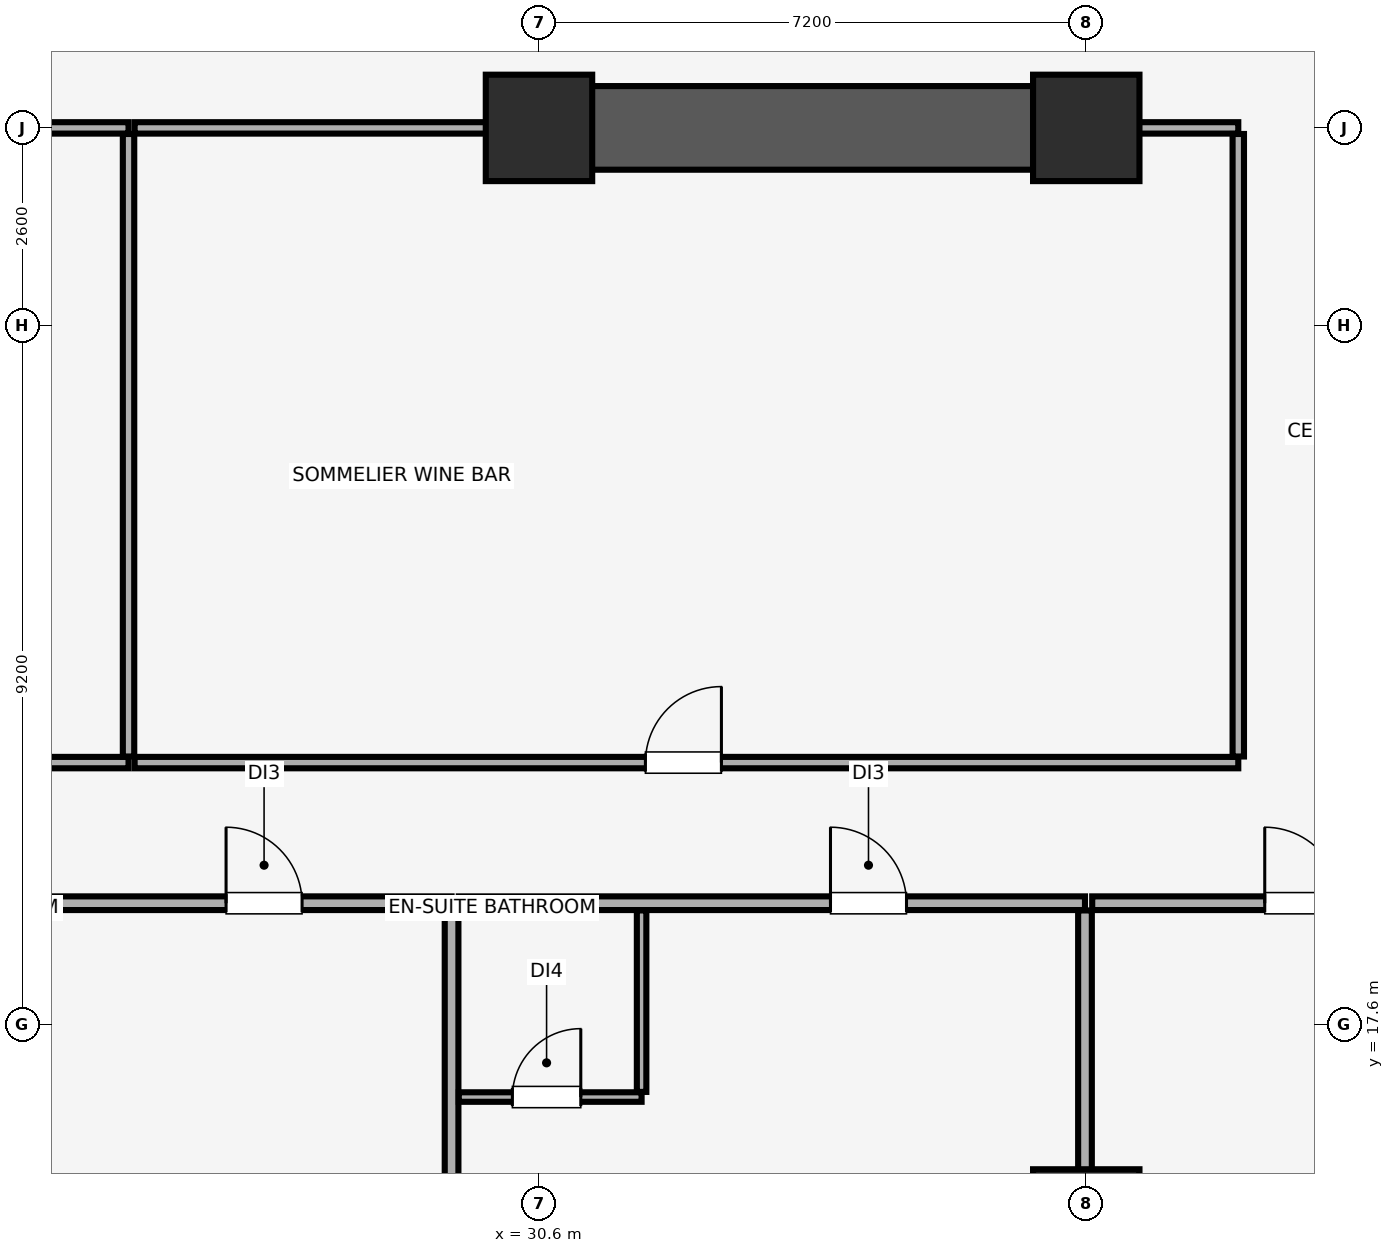
"""IFC4 building model, lengths in metres.
Left out: names, types, materials, properties, quantities, classifications, styles, units other than length and angle.
Written with IfcOpenShell. Run it as: python <this file> out.ifc"""

import sys

from ifc_helpers import new_model, si_unit, direction, frame, frame_2d, origin, origin_2d, place, context, subcontext, project, spatial, rectangle, extrude, element, fill, save


model = new_model("IFC4")
c1 = context("Model", 3, precision=1e-05, world=origin(), true_north=direction((0.0, 1.0)))
c2 = subcontext(c1, "Body", "Model", "MODEL_VIEW")
j1 = project(units=[si_unit("LENGTHUNIT", "METRE"), si_unit("PLANEANGLEUNIT", "RADIAN")], contexts=[c1])
p1 = place(None, origin())
s1 = spatial("IfcSite", under=j1, at=p1, CompositionType="ELEMENT")
p2 = place(p1, origin())
s2 = spatial("IfcBuilding", under=s1, at=p2, CompositionType="ELEMENT")
p3 = place(p2, frame((0.0, 0.0, 76.4)))
s3 = spatial("IfcBuildingStorey", under=s2, at=p3, CompositionType="ELEMENT", Elevation=76.4)
for number, where, z_axis, x_axis in (
    (1, (37.8, 15.0, 0.0), (0.0, 0.0, 1.0), (1.0, 0.0, 0.0)),
    (2, (30.6, 29.4, 0.0), (0.0, 0.0, 1.0), (1.0, 0.0, 0.0)),
    (3, (37.8, 29.4, 0.0), (0.0, 0.0, 1.0), (1.0, 0.0, 0.0)),
):
    element("IfcColumn", number, at=place(p3, frame(where, z_axis=z_axis, x_axis=x_axis)), inside=s3, PredefinedType="COLUMN", context=c2, shape_type="SweptSolid", body=[
        extrude(rectangle(XDim=1.4, YDim=1.4, at=origin_2d()), origin(), (0.0, 0.0, 1.0), 3.4),
    ])
p4 = place(p3, frame((30.4, 29.4, 0.0), z_axis=(0.0, 0.0, 1.0), x_axis=(1.0, 0.0, 0.0)))
e4 = element("IfcWall", 4, at=p4, inside=s3, PredefinedType="SHEAR", context=c2, shape_type="SweptSolid", body=[
    extrude(rectangle(XDim=7.6, YDim=1.1, at=frame_2d((3.8, 0.0))), origin(), (0.0, 0.0, 1.0), 3.4),
])
p5 = place(p3, frame((21.212, 19.2, 0.0), z_axis=(0.0, 0.0, 1.0), x_axis=(1.0, 0.0, 0.0)))
e5 = element("IfcWall", 5, at=p5, inside=s3, PredefinedType="PARTITIONING", context=c2, shape_type="SweptSolid", body=[
    extrude(rectangle(XDim=8.238, YDim=0.18, at=frame_2d((4.119, 0.0))), origin(), (0.0, 0.0, 1.0), 3.4),
])
p6 = place(p5, frame((5.271, 0.0, 0.0)))
e6 = element("IfcOpeningElement", 6, at=p6, cuts=e5, PredefinedType="OPENING", context=c2, shape_type="SweptSolid", body=[
    extrude(rectangle(XDim=1.0, YDim=2.15, at=frame_2d((0.5, 1.075))), frame((0.0, 0.1, 0.0), z_axis=(0.0, -1.0, 0.0), x_axis=(1.0, 0.0, 0.0)), (0.0, 0.0, 1.0), 0.2),
])
p7 = place(p3, frame((29.45, 0.15, 0.0), z_axis=(0.0, 0.0, 1.0), x_axis=(0.0, 1.0, 0.0)))
e7 = element("IfcWall", 7, at=p7, inside=s3, PredefinedType="PARTITIONING", context=c2, shape_type="SweptSolid", body=[
    extrude(rectangle(XDim=18.955, YDim=0.18, at=frame_2d((9.478, 0.0))), origin(), (0.0, 0.0, 1.0), 3.4),
])
p8 = place(p3, frame((29.545, 19.2, 0.0), z_axis=(0.0, 0.0, 1.0), x_axis=(1.0, 0.0, 0.0)))
e8 = element("IfcWall", 8, at=p8, inside=s3, PredefinedType="PARTITIONING", context=c2, shape_type="SweptSolid", body=[
    extrude(rectangle(XDim=8.238, YDim=0.18, at=frame_2d((4.119, 0.0))), origin(), (0.0, 0.0, 1.0), 3.4),
])
p9 = place(p8, frame((4.89, 0.0, 0.0)))
e9 = element("IfcOpeningElement", 9, at=p9, cuts=e8, PredefinedType="OPENING", context=c2, shape_type="SweptSolid", body=[
    extrude(rectangle(XDim=1.0, YDim=2.15, at=frame_2d((0.5, 1.075))), frame((0.0, 0.1, 0.0), z_axis=(0.0, -1.0, 0.0), x_axis=(1.0, 0.0, 0.0)), (0.0, 0.0, 1.0), 0.2),
])
p10 = place(p3, frame((37.783, 0.15, 0.0), z_axis=(0.0, 0.0, 1.0), x_axis=(0.0, 1.0, 0.0)))
e10 = element("IfcWall", 10, at=p10, inside=s3, PredefinedType="PARTITIONING", context=c2, shape_type="SweptSolid", body=[
    extrude(rectangle(XDim=18.955, YDim=0.18, at=frame_2d((9.478, 0.0))), origin(), (0.0, 0.0, 1.0), 2.8),
])
p11 = place(p3, frame((29.545, 16.65, 0.0), z_axis=(0.0, 0.0, 1.0), x_axis=(1.0, 0.0, 0.0)))
e11 = element("IfcWall", 11, at=p11, inside=s3, PredefinedType="PARTITIONING", context=c2, shape_type="SweptSolid", body=[
    extrude(rectangle(XDim=2.405, YDim=0.125, at=frame_2d((1.203, 0.0))), origin(), (0.0, 0.0, 1.0), 3.4),
])
p12 = place(p11, frame((0.705, 0.0, 0.0)))
e12 = element("IfcOpeningElement", 12, at=p12, cuts=e11, PredefinedType="OPENING", context=c2, shape_type="SweptSolid", body=[
    extrude(rectangle(XDim=0.9, YDim=2.1, at=frame_2d((0.45, 1.05))), frame((0.0, 0.073, 0.0), z_axis=(0.0, -1.0, 0.0), x_axis=(1.0, 0.0, 0.0)), (0.0, 0.0, 1.0), 0.145),
])
p13 = place(p3, frame((31.95, 16.718, 0.0), z_axis=(0.0, 0.0, 1.0), x_axis=(0.0, 1.0, 0.0)))
e13 = element("IfcWall", 13, at=p13, inside=s3, PredefinedType="PARTITIONING", context=c2, shape_type="SweptSolid", body=[
    extrude(rectangle(XDim=2.387, YDim=0.125, at=frame_2d((1.194, 0.0))), origin(), (0.0, 0.0, 1.0), 3.4),
])
p14 = place(p3, frame((37.878, 19.2, 0.0), z_axis=(0.0, 0.0, 1.0), x_axis=(1.0, 0.0, 0.0)))
e14 = element("IfcWall", 14, at=p14, inside=s3, PredefinedType="PARTITIONING", context=c2, shape_type="SweptSolid", body=[
    extrude(rectangle(XDim=8.238, YDim=0.18, at=frame_2d((4.119, 0.0))), origin(), (0.0, 0.0, 1.0), 3.4),
])
p15 = place(p14, frame((2.27, 0.0, 0.0)))
e15 = element("IfcOpeningElement", 15, at=p15, cuts=e14, PredefinedType="OPENING", context=c2, shape_type="SweptSolid", body=[
    extrude(rectangle(XDim=1.0, YDim=2.15, at=frame_2d((0.5, 1.075))), frame((0.0, 0.1, 0.0), z_axis=(0.0, -1.0, 0.0), x_axis=(1.0, 0.0, 0.0)), (0.0, 0.0, 1.0), 0.2),
])
p16 = place(p3, frame((15.8, 21.05, 0.0), z_axis=(0.0, 0.0, 1.0), x_axis=(1.0, 0.0, 0.0)))
e16 = element("IfcWall", 16, at=p16, inside=s3, PredefinedType="PARTITIONING", context=c2, shape_type="SweptSolid", body=[
    extrude(rectangle(XDim=9.4, YDim=0.15, at=frame_2d((4.7, 0.0))), origin(), (0.0, 0.0, 1.0), 3.4),
])
p17 = place(p16, frame((4.2, 0.0, 0.0)))
e17 = element("IfcOpeningElement", 17, at=p17, cuts=e16, PredefinedType="OPENING", context=c2, shape_type="SweptSolid", body=[
    extrude(rectangle(XDim=1.0, YDim=2.15, at=frame_2d((0.5, 1.075))), frame((0.0, 0.085, 0.0), z_axis=(0.0, -1.0, 0.0), x_axis=(1.0, 0.0, 0.0)), (0.0, 0.0, 1.0), 0.17),
])
p18 = place(p3, frame((23.61, 29.4, 0.0), z_axis=(0.0, 0.0, 1.0), x_axis=(1.0, 0.0, 0.0)))
e18 = element("IfcWall", 18, at=p18, inside=s3, PredefinedType="PARTITIONING", context=c2, shape_type="SweptSolid", body=[
    extrude(rectangle(XDim=1.59, YDim=0.15, at=frame_2d((0.795, 0.0))), origin(), (0.0, 0.0, 1.0), 2.3),
])
p19 = place(p3, frame((25.2, 21.13, 0.0), z_axis=(0.0, 0.0, 1.0), x_axis=(0.0, 1.0, 0.0)))
e19 = element("IfcWall", 19, at=p19, inside=s3, PredefinedType="PARTITIONING", context=c2, shape_type="SweptSolid", body=[
    extrude(rectangle(XDim=8.19, YDim=0.15, at=frame_2d((4.095, 0.0))), origin(), (0.0, 0.0, 1.0), 3.4),
])
p20 = place(p3, frame((25.28, 21.05, 0.0), z_axis=(0.0, 0.0, 1.0), x_axis=(1.0, 0.0, 0.0)))
e20 = element("IfcWall", 20, at=p20, inside=s3, PredefinedType="PARTITIONING", context=c2, shape_type="SweptSolid", body=[
    extrude(rectangle(XDim=14.52, YDim=0.15, at=frame_2d((7.26, 0.0))), origin(), (0.0, 0.0, 1.0), 3.4),
])
p21 = place(p20, frame((6.72, 0.0, 0.0)))
e21 = element("IfcOpeningElement", 21, at=p21, cuts=e20, PredefinedType="OPENING", context=c2, shape_type="SweptSolid", body=[
    extrude(rectangle(XDim=1.0, YDim=2.15, at=frame_2d((0.5, 1.075))), frame((0.0, 0.085, 0.0), z_axis=(0.0, -1.0, 0.0), x_axis=(1.0, 0.0, 0.0)), (0.0, 0.0, 1.0), 0.17),
])
p22 = place(p3, frame((25.28, 29.4, 0.0), z_axis=(0.0, 0.0, 1.0), x_axis=(1.0, 0.0, 0.0)))
e22 = element("IfcWall", 22, at=p22, inside=s3, PredefinedType="PARTITIONING", context=c2, shape_type="SweptSolid", body=[
    extrude(rectangle(XDim=5.11, YDim=0.15, at=frame_2d((2.555, 0.0))), origin(), (0.0, 0.0, 1.0), 2.3),
])
p23 = place(p3, frame((38.01, 29.4, 0.0), z_axis=(0.0, 0.0, 1.0), x_axis=(1.0, 0.0, 0.0)))
e23 = element("IfcWall", 23, at=p23, inside=s3, PredefinedType="PARTITIONING", context=c2, shape_type="SweptSolid", body=[
    extrude(rectangle(XDim=1.79, YDim=0.15, at=frame_2d((0.895, 0.0))), origin(), (0.0, 0.0, 1.0), 2.3),
])
p24 = place(p3, frame((39.8, 21.13, 0.0), z_axis=(0.0, 0.0, 1.0), x_axis=(0.0, 1.0, 0.0)))
e24 = element("IfcWall", 24, at=p24, inside=s3, PredefinedType="PARTITIONING", context=c2, shape_type="SweptSolid", body=[
    extrude(rectangle(XDim=8.19, YDim=0.15, at=frame_2d((4.095, 0.0))), origin(), (0.0, 0.0, 1.0), 3.4),
])
p25 = place(p6, origin())
e25 = element("IfcDoor", 25, at=p25, inside=s3, OperationType="SINGLE_SWING_LEFT", PredefinedType="DOOR", context=c2, shape_type="SweptSolid", body=[
    extrude(rectangle(XDim=1.0, YDim=2.15, at=frame_2d((0.5, 1.075))), frame((0.0, 0.025, 0.0), z_axis=(0.0, -1.0, 0.0), x_axis=(1.0, 0.0, 0.0)), (0.0, 0.0, 1.0), 0.05),
])
fill(e6, e25)
p26 = place(p9, origin())
e26 = element("IfcDoor", 26, at=p26, inside=s3, OperationType="SINGLE_SWING_LEFT", PredefinedType="DOOR", context=c2, shape_type="SweptSolid", body=[
    extrude(rectangle(XDim=1.0, YDim=2.15, at=frame_2d((0.5, 1.075))), frame((0.0, 0.025, 0.0), z_axis=(0.0, -1.0, 0.0), x_axis=(1.0, 0.0, 0.0)), (0.0, 0.0, 1.0), 0.05),
])
fill(e9, e26)
p27 = place(p12, origin())
e27 = element("IfcDoor", 27, at=p27, inside=s3, OperationType="SINGLE_SWING_RIGHT", PredefinedType="DOOR", context=c2, shape_type="SweptSolid", body=[
    extrude(rectangle(XDim=0.9, YDim=2.1, at=frame_2d((0.45, 1.05))), frame((0.0, 0.025, 0.0), z_axis=(0.0, -1.0, 0.0), x_axis=(1.0, 0.0, 0.0)), (0.0, 0.0, 1.0), 0.05),
])
fill(e12, e27)
p28 = place(p15, origin())
e28 = element("IfcDoor", 28, at=p28, inside=s3, OperationType="SINGLE_SWING_LEFT", PredefinedType="DOOR", context=c2, shape_type="SweptSolid", body=[
    extrude(rectangle(XDim=1.0, YDim=2.15, at=frame_2d((0.5, 1.075))), frame((0.0, 0.025, 0.0), z_axis=(0.0, -1.0, 0.0), x_axis=(1.0, 0.0, 0.0)), (0.0, 0.0, 1.0), 0.05),
])
fill(e15, e28)
p29 = place(p21, origin())
e29 = element("IfcDoor", 29, at=p29, inside=s3, OperationType="SINGLE_SWING_RIGHT", PredefinedType="DOOR", context=c2, shape_type="SweptSolid", body=[
    extrude(rectangle(XDim=1.0, YDim=2.15, at=frame_2d((0.5, 1.075))), frame((0.0, 0.025, 0.0), z_axis=(0.0, -1.0, 0.0), x_axis=(1.0, 0.0, 0.0)), (0.0, 0.0, 1.0), 0.05),
])
fill(e21, e29)
save(model, sys.argv[1])
